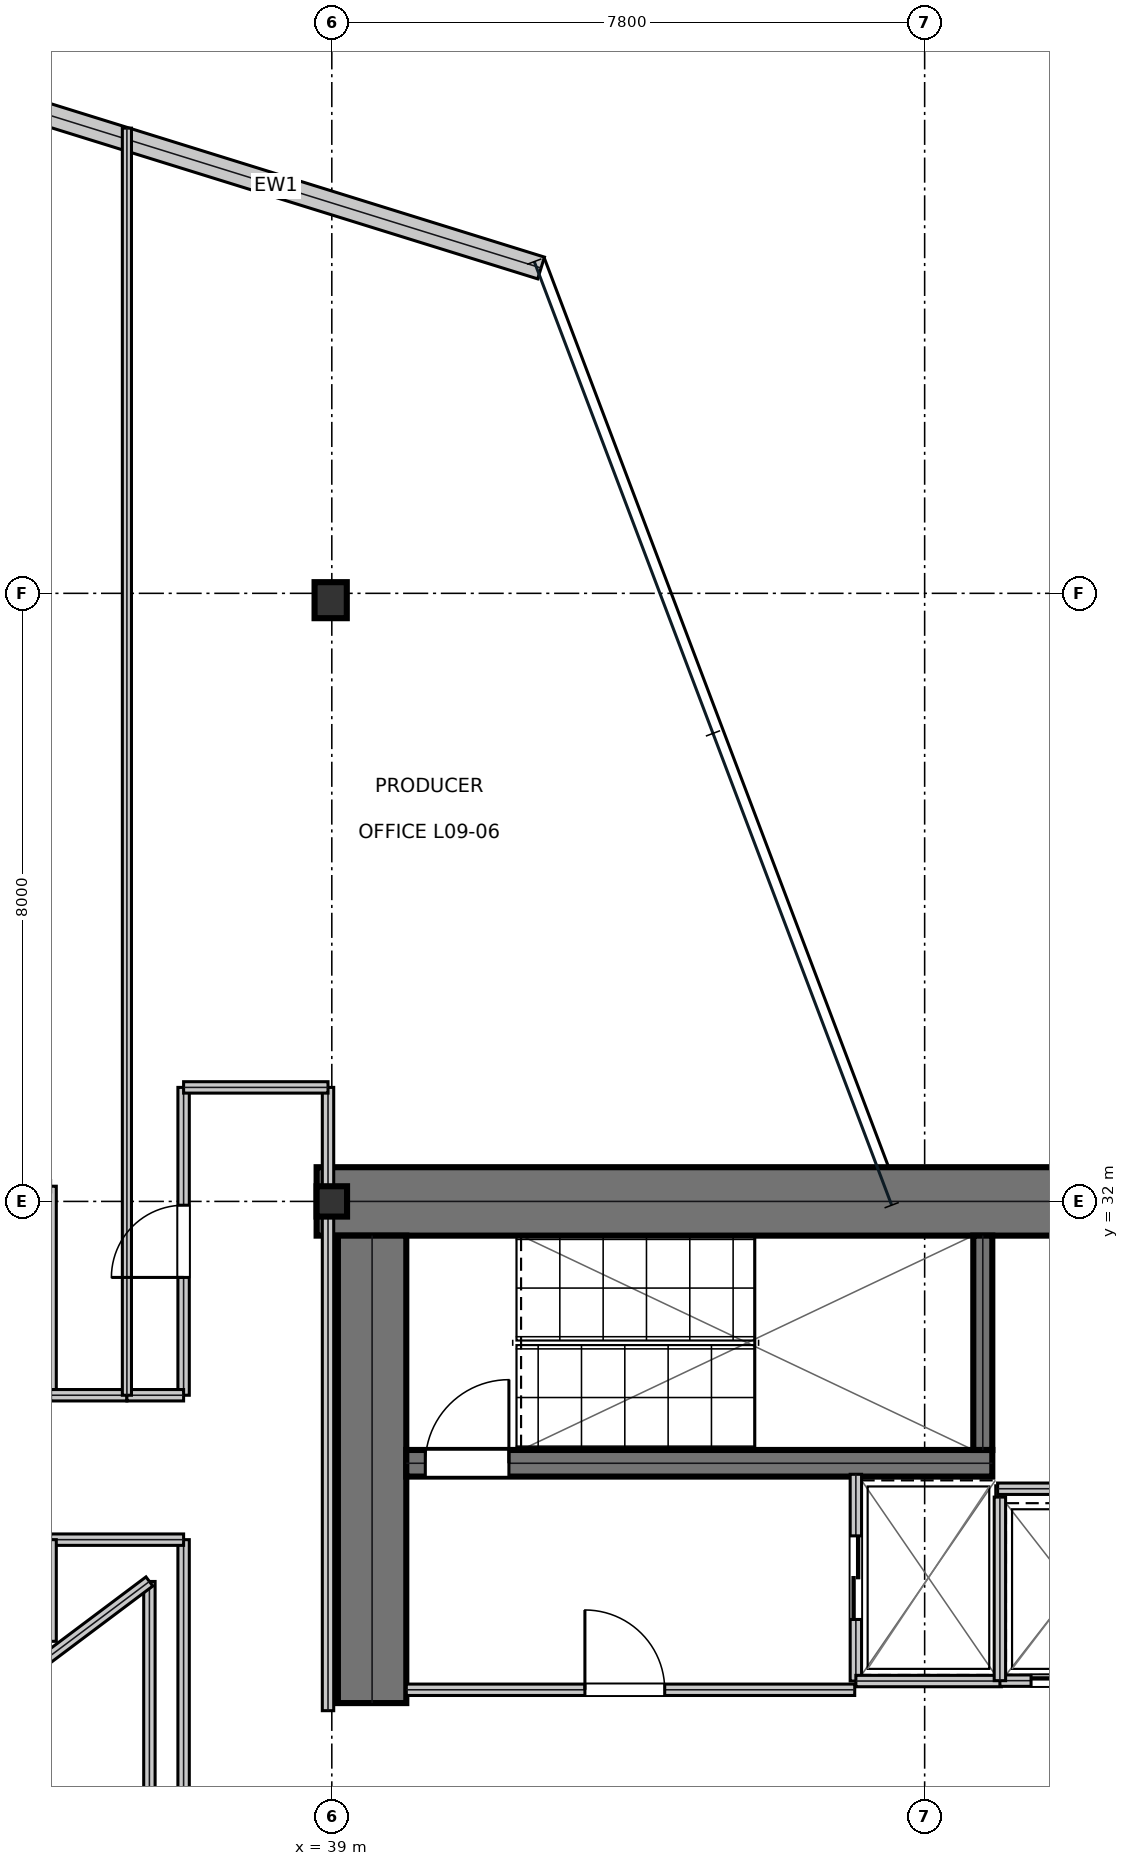
"""IFC4 building model, lengths in metres.
Left out: names, types, materials, properties, quantities, classifications, styles, units other than length and angle.
Written with IfcOpenShell. Run it as: python <this file> out.ifc"""

import sys

from ifc_helpers import new_model, si_unit, direction, frame, frame_2d, origin, origin_2d, place, context, subcontext, project, spatial, rectangle, i_section, extrude, element, fill, save


model = new_model("IFC4")
c1 = context("Model", 3, precision=1e-05, world=origin(), true_north=direction((0.0, 1.0)))
c2 = subcontext(c1, "Body", "Model", "MODEL_VIEW")
j1 = project(units=[si_unit("LENGTHUNIT", "METRE"), si_unit("PLANEANGLEUNIT", "RADIAN")], contexts=[c1])
p1 = place(None, origin())
s1 = spatial("IfcSite", under=j1, at=p1, CompositionType="ELEMENT")
p2 = place(p1, origin())
s2 = spatial("IfcBuilding", under=s1, at=p2, CompositionType="ELEMENT")
p3 = place(p2, frame((0.0, 0.0, 45.9)))
s3 = spatial("IfcBuildingStorey", under=s2, at=p3, CompositionType="ELEMENT", Elevation=45.9)
p4 = place(p3, frame((38.8, 32.0, 0.0), z_axis=(0.0, 0.0, 1.0), x_axis=(1.0, 0.0, 0.0)))
e1 = element("IfcWall", 1, at=p4, inside=s3, PredefinedType="SHEAR", context=c2, shape_type="SweptSolid", body=[
    extrude(rectangle(XDim=16.0, YDim=0.9, at=frame_2d((8.0, 0.0))), origin(), (0.0, 0.0, 1.0), 3.81),
])
p5 = place(p3, frame((39.53, 25.4, 0.0), z_axis=(0.0, 0.0, 1.0), x_axis=(0.0, 1.0, 0.0)))
e2 = element("IfcWall", 2, at=p5, inside=s3, PredefinedType="SHEAR", context=c2, shape_type="SweptSolid", body=[
    extrude(rectangle(XDim=6.15, YDim=0.9, at=frame_2d((3.075, 0.0))), origin(), (0.0, 0.0, 1.0), 3.81),
])
p6 = place(p3, frame((39.98, 28.555, 0.0), z_axis=(0.0, 0.0, 1.0), x_axis=(1.0, 0.0, 0.0)))
e3 = element("IfcWall", 3, at=p6, inside=s3, PredefinedType="SHEAR", context=c2, shape_type="SweptSolid", body=[
    extrude(rectangle(XDim=7.71, YDim=0.35, at=frame_2d((3.855, 0.0))), origin(), (0.0, 0.0, 1.0), 3.81),
])
p7 = place(p6, frame((0.25, 0.0, 0.0)))
e4 = element("IfcOpeningElement", 4, at=p7, cuts=e3, PredefinedType="OPENING", context=c2, shape_type="SweptSolid", body=[
    extrude(rectangle(XDim=1.1, YDim=2.15, at=frame_2d((0.55, 1.075))), frame((0.0, 0.185, 0.0), z_axis=(0.0, -1.0, 0.0), x_axis=(1.0, 0.0, 0.0)), (0.0, 0.0, 1.0), 0.37),
])
p8 = place(p3, frame((47.565, 28.73, 0.0), z_axis=(0.0, 0.0, 1.0), x_axis=(0.0, 1.0, 0.0)))
e5 = element("IfcWall", 5, at=p8, inside=s3, PredefinedType="SHEAR", context=c2, shape_type="SweptSolid", body=[
    extrude(rectangle(XDim=2.82, YDim=0.25, at=frame_2d((1.41, 0.0))), origin(), (0.0, 0.0, 1.0), 3.81),
])
p9 = place(p3, frame((39.0, 32.0, 0.0), z_axis=(0.0, 0.0, 1.0), x_axis=(1.0, 0.0, 0.0)))
e6 = element("IfcColumn", 6, at=p9, inside=s3, PredefinedType="COLUMN", context=c2, shape_type="SweptSolid", body=[
    extrude(i_section(OverallWidth=0.401, OverallDepth=0.399, WebThickness=0.025, FlangeThickness=0.04, at=origin_2d()), origin(), (0.0, 0.0, 1.0), 4.044),
])
p10 = place(p3, frame((38.985, 39.91, 0.016), z_axis=(-0.006253881592, -0.037280420364, 0.999285274195), x_axis=(0.986219728076, -0.165440768716, 0.0)))
e7 = element("IfcColumn", 7, at=p10, inside=s3, PredefinedType="COLUMN", context=c2, shape_type="SweptSolid", body=[
    extrude(i_section(OverallWidth=0.424, OverallDepth=0.474, WebThickness=0.048, FlangeThickness=0.077, at=origin_2d()), origin(), (0.0, 0.0, 1.0), 4.021),
])
p11 = place(p3, frame((41.753, 44.28, 0.0), z_axis=(0.0, 0.0, 1.0), x_axis=(-0.954957033511, 0.296744105498, 0.0)))
e8 = element("IfcWall", 8, at=p11, inside=s3, PredefinedType="STANDARD", context=c2, shape_type="SweptSolid", body=[
    extrude(rectangle(XDim=7.302, YDim=0.3, at=frame_2d((3.651, 0.0))), origin(), (0.0, 0.0, 1.0), 3.81),
])
p12 = place(p3, frame((39.98, 25.575, 0.0), z_axis=(0.0, 0.0, 1.0), x_axis=(1.0, 0.0, 0.0)))
e9 = element("IfcWall", 9, at=p12, inside=s3, PredefinedType="PARTITIONING", context=c2, shape_type="SweptSolid", body=[
    extrude(rectangle(XDim=5.9, YDim=0.15, at=frame_2d((2.95, 0.0))), origin(), (0.0, 0.0, 1.0), 3.81),
])
p13 = place(p12, frame((2.35, 0.0, 0.0)))
e10 = element("IfcOpeningElement", 10, at=p13, cuts=e9, PredefinedType="OPENING", context=c2, shape_type="SweptSolid", body=[
    extrude(rectangle(XDim=1.05, YDim=2.15, at=frame_2d((0.525, 1.075))), frame((0.0, 0.085, 0.0), z_axis=(0.0, -1.0, 0.0), x_axis=(1.0, 0.0, 0.0)), (0.0, 0.0, 1.0), 0.17),
])
p14 = place(p3, frame((45.895, 25.69, 0.0), z_axis=(0.0, 0.0, 1.0), x_axis=(0.0, 1.0, 0.0)))
e11 = element("IfcWall", 11, at=p14, inside=s3, PredefinedType="PARTITIONING", context=c2, shape_type="SweptSolid", body=[
    extrude(rectangle(XDim=2.72, YDim=0.15, at=frame_2d((1.36, 0.0))), origin(), (0.0, 0.0, 1.0), 3.81),
])
p15 = place(p14, frame((0.81, 0.0, 0.0)))
e12 = element("IfcOpeningElement", 12, at=p15, cuts=e11, PredefinedType="OPENING", context=c2, shape_type="SweptSolid", body=[
    extrude(rectangle(XDim=1.1, YDim=2.15, at=frame_2d((0.55, 1.075))), frame((0.0, 0.085, 0.0), z_axis=(0.0, -1.0, 0.0), x_axis=(1.0, 0.0, 0.0)), (0.0, 0.0, 1.0), 0.17),
])
p16 = place(p3, frame((45.895, 25.69, 0.0), z_axis=(0.0, 0.0, 1.0), x_axis=(1.0, 0.0, 0.0)))
e13 = element("IfcWall", 13, at=p16, inside=s3, PredefinedType="PARTITIONING", context=c2, shape_type="SweptSolid", body=[
    extrude(rectangle(XDim=1.915, YDim=0.15, at=frame_2d((0.958, 0.0))), origin(), (0.0, 0.0, 1.0), 3.81),
])
p17 = place(p3, frame((47.79, 25.695, 0.0), z_axis=(0.0, 0.0, 1.0), x_axis=(1.0, 0.0, 0.0)))
e14 = element("IfcWall", 14, at=p17, inside=s3, PredefinedType="PARTITIONING", context=c2, shape_type="SweptSolid", body=[
    extrude(rectangle(XDim=1.92, YDim=0.15, at=frame_2d((0.96, 0.0))), origin(), (0.0, 0.0, 1.0), 3.81),
])
p18 = place(p17, frame((0.41, 0.0, 0.0)))
e15 = element("IfcOpeningElement", 15, at=p18, cuts=e14, PredefinedType="OPENING", context=c2, shape_type="SweptSolid", body=[
    extrude(rectangle(XDim=1.1, YDim=2.15, at=frame_2d((0.55, 1.075))), frame((0.0, 0.085, 0.0), z_axis=(0.0, -1.0, 0.0), x_axis=(1.0, 0.0, 0.0)), (0.0, 0.0, 1.0), 0.17),
])
p19 = place(p3, frame((47.79, 25.695, 0.0), z_axis=(0.0, 0.0, 1.0), x_axis=(0.0, 1.0, 0.0)))
e16 = element("IfcWall", 16, at=p19, inside=s3, PredefinedType="PARTITIONING", context=c2, shape_type="SweptSolid", body=[
    extrude(rectangle(XDim=2.415, YDim=0.15, at=frame_2d((1.208, 0.0))), origin(), (0.0, 0.0, 1.0), 3.81),
])
p20 = place(p3, frame((47.76, 28.22, 0.0), z_axis=(0.0, 0.0, 1.0), x_axis=(1.0, 0.0, 0.0)))
e17 = element("IfcWall", 17, at=p20, inside=s3, PredefinedType="PARTITIONING", context=c2, shape_type="SweptSolid", body=[
    extrude(rectangle(XDim=1.96, YDim=0.15, at=frame_2d((0.98, 0.0))), origin(), (0.0, 0.0, 1.0), 3.81),
])
p21 = place(p3, frame((37.05, 14.5, 0.0), z_axis=(0.0, 0.0, 1.0), x_axis=(0.0, 1.0, 0.0)))
e18 = element("IfcWall", 18, at=p21, inside=s3, PredefinedType="PARTITIONING", context=c2, shape_type="SweptSolid", body=[
    extrude(rectangle(XDim=13.05, YDim=0.15, at=frame_2d((6.525, 0.0))), origin(), (0.0, 0.0, 1.0), 3.181),
])
p22 = place(p21, frame((4.61, 0.0, 0.0)))
e19 = element("IfcOpeningElement", 19, at=p22, cuts=e18, PredefinedType="OPENING", context=c2, shape_type="SweptSolid", body=[
    extrude(rectangle(XDim=0.95, YDim=2.15, at=frame_2d((0.475, 1.075))), frame((0.0, 0.085, 0.0), z_axis=(0.0, -1.0, 0.0), x_axis=(1.0, 0.0, 0.0)), (0.0, 0.0, 1.0), 0.17),
])
p23 = place(p3, frame((37.05, 29.45, 0.0), z_axis=(0.0, 0.0, 1.0), x_axis=(0.0, 1.0, 0.0)))
e20 = element("IfcWall", 20, at=p23, inside=s3, PredefinedType="PARTITIONING", context=c2, shape_type="SweptSolid", body=[
    extrude(rectangle(XDim=4.05, YDim=0.15, at=frame_2d((2.025, 0.0))), origin(), (0.0, 0.0, 1.0), 3.181),
])
p24 = place(p23, frame((1.55, 0.0, 0.0)))
e21 = element("IfcOpeningElement", 21, at=p24, cuts=e20, PredefinedType="OPENING", context=c2, shape_type="SweptSolid", body=[
    extrude(rectangle(XDim=0.95, YDim=2.15, at=frame_2d((0.475, 1.075))), frame((0.0, 0.085, 0.0), z_axis=(0.0, -1.0, 0.0), x_axis=(1.0, 0.0, 0.0)), (0.0, 0.0, 1.0), 0.17),
])
p25 = place(p3, frame((35.3, 27.55, 0.0), z_axis=(0.0, 0.0, 1.0), x_axis=(1.0, 0.0, 0.0)))
e22 = element("IfcWall", 22, at=p25, inside=s3, PredefinedType="PARTITIONING", context=c2, shape_type="SweptSolid", body=[
    extrude(rectangle(XDim=1.75, YDim=0.15, at=frame_2d((0.875, 0.0))), origin(), (0.0, 0.0, 1.0), 3.391),
])
p26 = place(p3, frame((35.3, 26.212, 0.0), z_axis=(0.0, 0.0, 1.0), x_axis=(0.0, 1.0, 0.0)))
e23 = element("IfcWall", 23, at=p26, inside=s3, PredefinedType="PARTITIONING", context=c2, shape_type="SweptSolid", body=[
    extrude(rectangle(XDim=1.338, YDim=0.15, at=frame_2d((0.669, 0.0))), origin(), (0.0, 0.0, 1.0), 3.81),
])
p27 = place(p3, frame((35.3, 29.45, 0.0), z_axis=(0.0, 0.0, 1.0), x_axis=(0.0, 1.0, 0.0)))
e24 = element("IfcWall", 24, at=p27, inside=s3, PredefinedType="PARTITIONING", context=c2, shape_type="SweptSolid", body=[
    extrude(rectangle(XDim=2.75, YDim=0.15, at=frame_2d((1.375, 0.0))), origin(), (0.0, 0.0, 1.0), 3.181),
])
p28 = place(p3, frame((35.3, 29.45, 0.0), z_axis=(0.0, 0.0, 1.0), x_axis=(1.0, 0.0, 0.0)))
e25 = element("IfcWall", 25, at=p28, inside=s3, PredefinedType="PARTITIONING", context=c2, shape_type="SweptSolid", body=[
    extrude(rectangle(XDim=1.004, YDim=0.15, at=frame_2d((0.502, 0.0))), origin(), (0.0, 0.0, 1.0), 3.81),
])
p29 = place(p3, frame((38.95, 25.3, 0.0), z_axis=(0.0, 0.0, 1.0), x_axis=(0.0, 1.0, 0.0)))
e26 = element("IfcWall", 26, at=p29, inside=s3, PredefinedType="PARTITIONING", context=c2, shape_type="SweptSolid", body=[
    extrude(rectangle(XDim=8.2, YDim=0.15, at=frame_2d((4.1, 0.0))), origin(), (0.0, 0.0, 1.0), 3.181),
])
p30 = place(p3, frame((37.05, 33.5, 0.0), z_axis=(0.0, 0.0, 1.0), x_axis=(1.0, 0.0, 0.0)))
e27 = element("IfcWall", 27, at=p30, inside=s3, PredefinedType="PARTITIONING", context=c2, shape_type="SweptSolid", body=[
    extrude(rectangle(XDim=1.9, YDim=0.15, at=frame_2d((0.95, 0.0))), origin(), (0.0, 0.0, 1.0), 3.81),
])
p31 = place(p3, frame((36.304, 29.45, 0.0), z_axis=(0.0, 0.0, 1.0), x_axis=(1.0, 0.0, 0.0)))
e28 = element("IfcWall", 28, at=p31, inside=s3, PredefinedType="PARTITIONING", context=c2, shape_type="SweptSolid", body=[
    extrude(rectangle(XDim=0.746, YDim=0.15, at=frame_2d((0.373, 0.0))), origin(), (0.0, 0.0, 1.0), 3.81),
])
p32 = place(p3, frame((36.304, 29.45, 0.0), z_axis=(0.0, 0.0, 1.0), x_axis=(0.0, 1.0, 0.0)))
e29 = element("IfcWall", 29, at=p32, inside=s3, PredefinedType="PARTITIONING", context=c2, shape_type="SweptSolid", body=[
    extrude(rectangle(XDim=16.67, YDim=0.12, at=frame_2d((8.335, 0.0))), origin(), (0.0, 0.0, 1.0), 3.181),
])
p33 = place(p3, frame((36.6, 21.0, 0.0), z_axis=(0.0, 0.0, 1.0), x_axis=(0.0, 1.0, 0.0)))
e30 = element("IfcWall", 30, at=p33, inside=s3, PredefinedType="MOVABLE", context=c2, shape_type="SweptSolid", body=[
    extrude(rectangle(XDim=6.0, YDim=0.15, at=frame_2d((3.0, 0.0))), origin(), (0.0, 0.0, 1.0), 3.81),
])
p34 = place(p3, frame((36.6, 27.0, 0.0), z_axis=(0.0, 0.0, 1.0), x_axis=(-0.8, -0.6, 0.0)))
e31 = element("IfcWall", 31, at=p34, inside=s3, PredefinedType="MOVABLE", context=c2, shape_type="SweptSolid", body=[
    extrude(rectangle(XDim=5.0, YDim=0.15, at=frame_2d((2.5, 0.0))), origin(), (0.0, 0.0, 1.0), 3.81),
])
p35 = place(p13, origin())
e32 = element("IfcDoor", 32, at=p35, inside=s3, OperationType="SINGLE_SWING_LEFT", PredefinedType="DOOR", context=c2, shape_type="SweptSolid", body=[
    extrude(rectangle(XDim=1.05, YDim=2.15, at=frame_2d((0.525, 1.075))), frame((0.0, 0.025, 0.0), z_axis=(0.0, -1.0, 0.0), x_axis=(1.0, 0.0, 0.0)), (0.0, 0.0, 1.0), 0.05),
])
fill(e10, e32)
p36 = place(p15, frame((1.1, 0.0, 0.0), z_axis=(0.0, 0.0, 1.0), x_axis=(-1.0, 0.0, 0.0)))
e33 = element("IfcDoor", 33, at=p36, inside=s3, OperationType="DOUBLE_DOOR_SLIDING", PredefinedType="DOOR", context=c2, shape_type="SweptSolid", body=[
    extrude(rectangle(XDim=1.1, YDim=2.15, at=frame_2d((0.55, 1.075))), frame((0.0, 0.025, 0.0), z_axis=(0.0, -1.0, 0.0), x_axis=(1.0, 0.0, 0.0)), (0.0, 0.0, 1.0), 0.05),
])
fill(e12, e33)
p37 = place(p18, frame((1.1, 0.0, 0.0), z_axis=(0.0, 0.0, 1.0), x_axis=(-1.0, 0.0, 0.0)))
e34 = element("IfcDoor", 34, at=p37, inside=s3, OperationType="DOUBLE_DOOR_SLIDING", PredefinedType="DOOR", context=c2, shape_type="SweptSolid", body=[
    extrude(rectangle(XDim=1.1, YDim=2.15, at=frame_2d((0.55, 1.075))), frame((0.0, 0.025, 0.0), z_axis=(0.0, -1.0, 0.0), x_axis=(1.0, 0.0, 0.0)), (0.0, 0.0, 1.0), 0.05),
])
fill(e15, e34)
p38 = place(p24, origin())
e35 = element("IfcDoor", 35, at=p38, inside=s3, OperationType="SINGLE_SWING_LEFT", PredefinedType="DOOR", context=c2, shape_type="SweptSolid", body=[
    extrude(rectangle(XDim=0.95, YDim=2.15, at=frame_2d((0.475, 1.075))), frame((0.0, 0.025, 0.0), z_axis=(0.0, -1.0, 0.0), x_axis=(1.0, 0.0, 0.0)), (0.0, 0.0, 1.0), 0.05),
])
fill(e21, e35)
p39 = place(p7, origin())
e36 = element("IfcDoor", 36, at=p39, inside=s3, OperationType="SINGLE_SWING_RIGHT", PredefinedType="DOOR", context=c2, shape_type="SweptSolid", body=[
    extrude(rectangle(XDim=1.1, YDim=2.15, at=frame_2d((0.55, 1.075))), frame((0.0, 0.025, 0.0), z_axis=(0.0, -1.0, 0.0), x_axis=(1.0, 0.0, 0.0)), (0.0, 0.0, 1.0), 0.05),
])
fill(e4, e36)
save(model, sys.argv[1])
